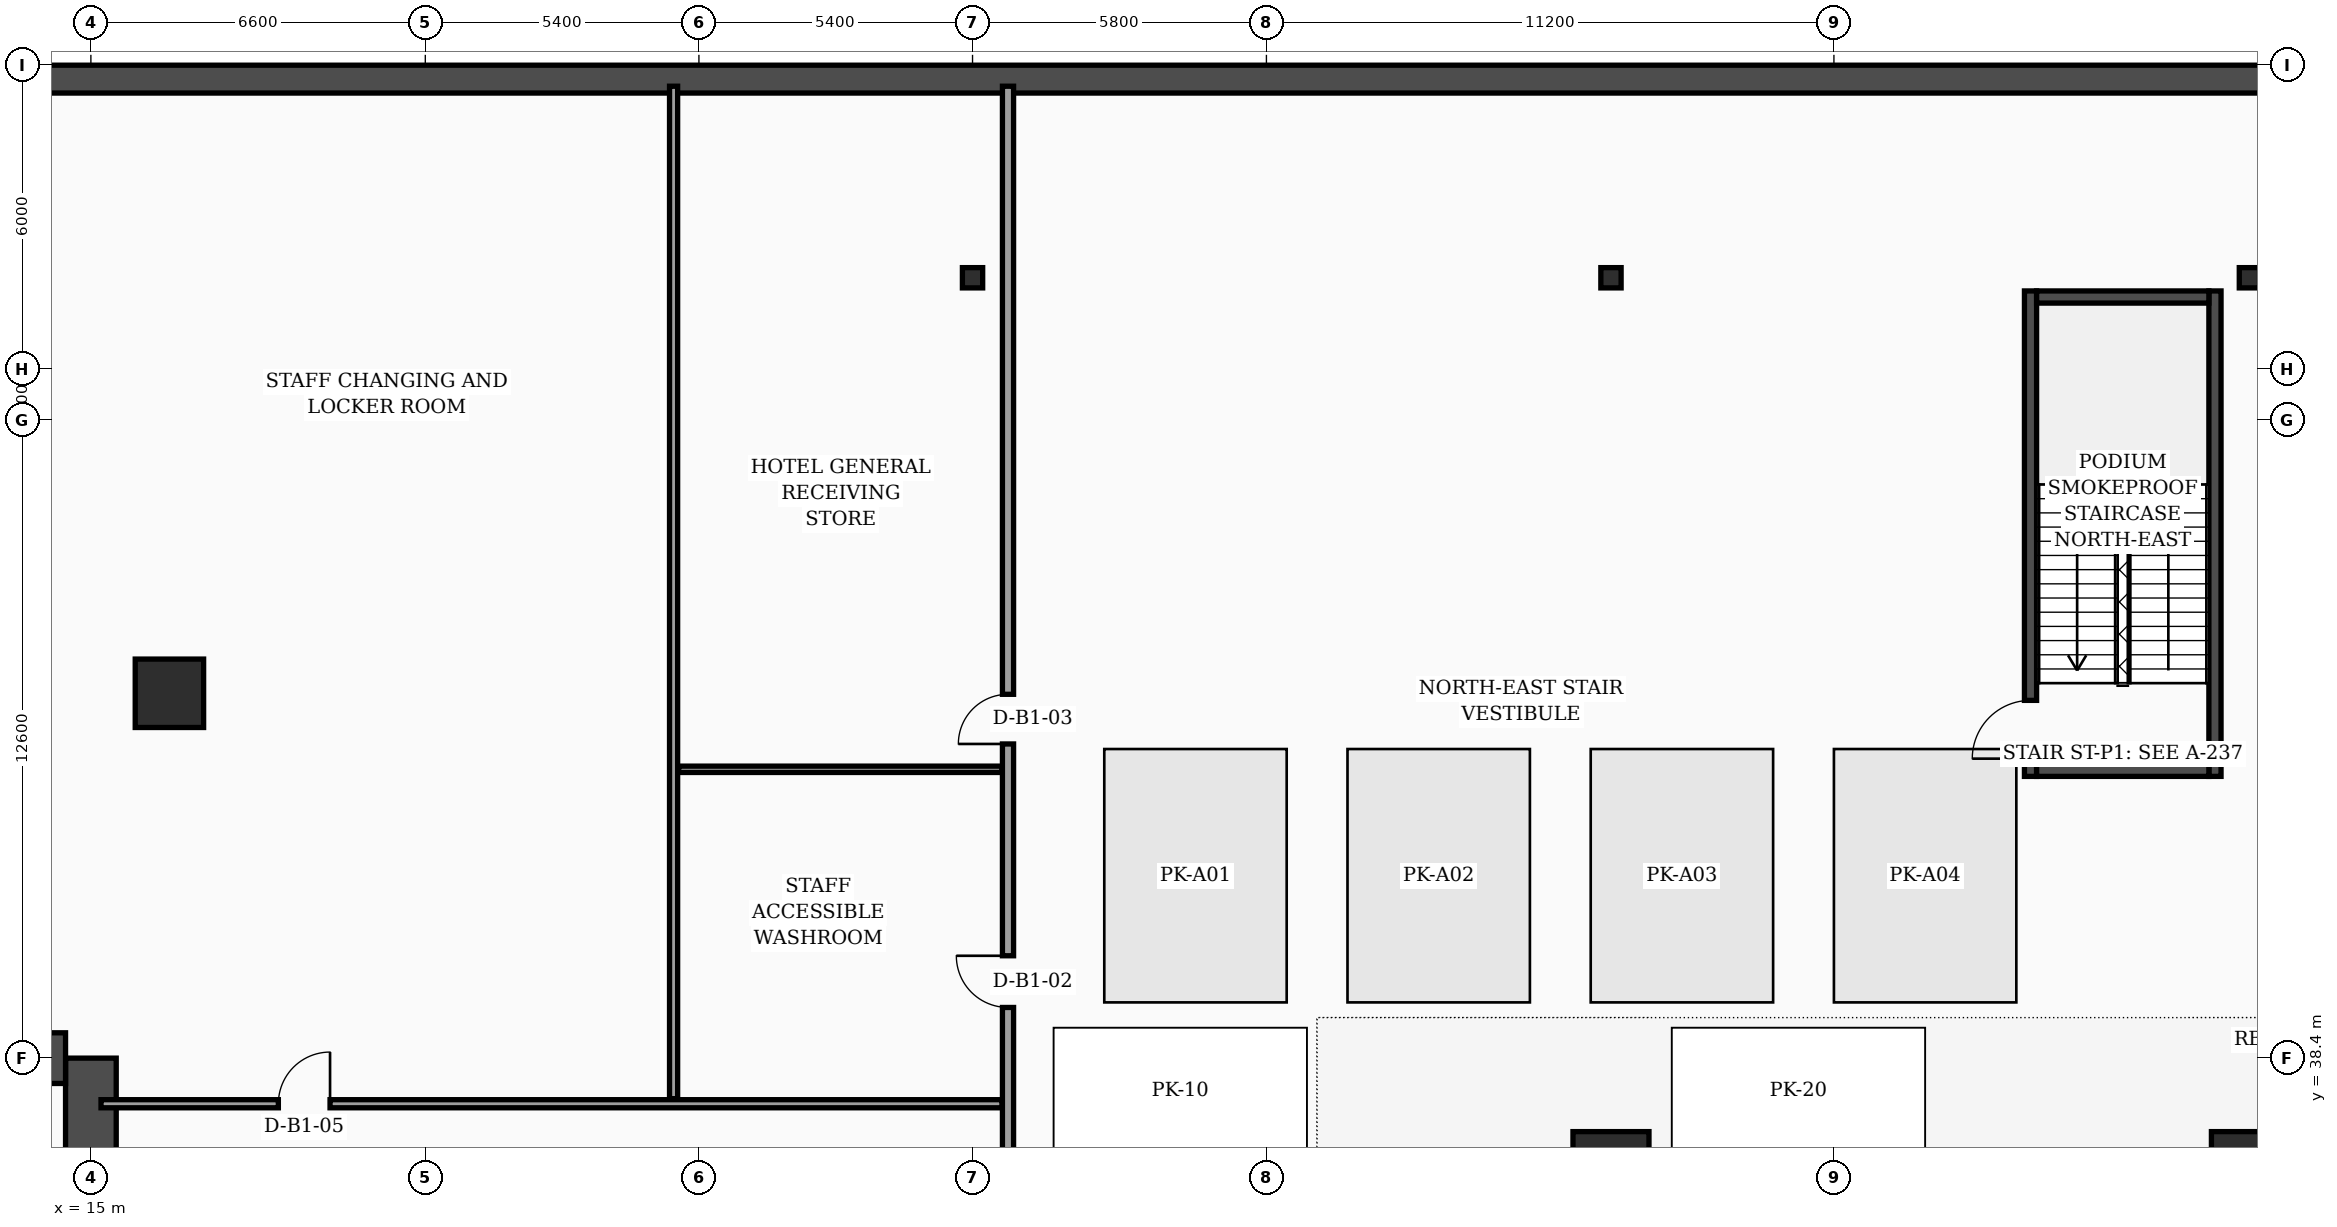
"""IFC4 building model, lengths in metres.
Left out: names, types, materials, properties, quantities, classifications, styles, units other than length and angle.
Written with IfcOpenShell. Run it as: python <this file> out.ifc"""

import sys

from ifc_helpers import new_model, si_unit, direction, frame, frame_2d, origin, origin_2d, place, context, subcontext, project, spatial, rectangle, i_section, extrude, element, fill, save


model = new_model("IFC4")
c1 = context("Model", 3, precision=1e-05, world=origin(), true_north=direction((0.0, 1.0)))
c2 = subcontext(c1, "Body", "Model", "MODEL_VIEW")
j1 = project(units=[si_unit("LENGTHUNIT", "METRE"), si_unit("PLANEANGLEUNIT", "RADIAN")], contexts=[c1])
p1 = place(None, origin())
s1 = spatial("IfcSite", under=j1, at=p1, CompositionType="ELEMENT")
p2 = place(p1, origin())
s2 = spatial("IfcBuilding", under=s1, at=p2, CompositionType="ELEMENT")
p3 = place(p2, frame((0.0, 0.0, -5.2)))
s3 = spatial("IfcBuildingStorey", under=s2, at=p3, CompositionType="ELEMENT", Elevation=-5.2)
p4 = place(p3, frame((83.72, 57.72, 0.0), z_axis=(0.0, 0.0, 1.0), x_axis=(-1.0, 0.0, 0.0)))
e1 = element("IfcWall", 1, at=p4, inside=s3, PredefinedType="USERDEFINED", context=c2, shape_type="SweptSolid", body=[
    extrude(rectangle(XDim=83.44, YDim=0.55, at=frame_2d((41.72, 0.0))), origin(), (0.0, 0.0, 1.0), 4.88),
])
p5 = place(p3, frame((15.0, 16.8, 0.0), z_axis=(0.0, 0.0, 1.0), x_axis=(0.0, 1.0, 0.0)))
e2 = element("IfcWall", 2, at=p5, inside=s3, PredefinedType="SHEAR", context=c2, shape_type="SweptSolid", body=[
    extrude(rectangle(XDim=21.6, YDim=1.0, at=frame_2d((10.8, 0.0))), origin(), (0.0, 0.0, 1.0), 4.88),
])
p6 = place(p5, frame((8.65, 0.0, 0.0)))
e3 = element("IfcOpeningElement", 3, at=p6, cuts=e2, PredefinedType="OPENING", context=c2, shape_type="SweptSolid", body=[
    extrude(rectangle(XDim=1.1, YDim=2.2, at=frame_2d((0.55, 1.1))), frame((0.0, 0.51, 0.0), z_axis=(0.0, -1.0, 0.0), x_axis=(1.0, 0.0, 0.0)), (0.0, 0.0, 1.0), 1.02),
])
p7 = place(p3, frame((4.7, 38.4, 0.0), z_axis=(0.0, 0.0, 1.0), x_axis=(1.0, 0.0, 0.0)))
e4 = element("IfcWall", 4, at=p7, inside=s3, PredefinedType="SHEAR", context=c2, shape_type="SweptSolid", body=[
    extrude(rectangle(XDim=9.8, YDim=1.0, at=frame_2d((4.9, 0.0))), origin(), (0.0, 0.0, 1.0), 4.88),
])
p8 = place(p3, frame((53.28, 43.96, 0.0), z_axis=(0.0, 0.0, 1.0), x_axis=(0.0, 1.0, 0.0)))
e5 = element("IfcWall", 5, at=p8, inside=s3, PredefinedType="SOLIDWALL", context=c2, shape_type="SweptSolid", body=[
    extrude(rectangle(XDim=9.58, YDim=0.24, at=frame_2d((4.79, 0.0))), origin(), (0.0, 0.0, 1.0), 4.88),
])
p9 = place(p8, frame((0.35, 0.0, 0.0)))
e6 = element("IfcOpeningElement", 6, at=p9, cuts=e5, PredefinedType="OPENING", context=c2, shape_type="SweptSolid", body=[
    extrude(rectangle(XDim=1.15, YDim=2.2, at=frame_2d((0.575, 1.1))), frame((0.0, 0.13, 0.0), z_axis=(0.0, -1.0, 0.0), x_axis=(1.0, 0.0, 0.0)), (0.0, 0.0, 1.0), 0.26),
])
p10 = place(p3, frame((56.92, 43.96, 0.0), z_axis=(0.0, 0.0, 1.0), x_axis=(0.0, 1.0, 0.0)))
e7 = element("IfcWall", 7, at=p10, inside=s3, PredefinedType="SOLIDWALL", context=c2, shape_type="SweptSolid", body=[
    extrude(rectangle(XDim=9.58, YDim=0.24, at=frame_2d((4.79, 0.0))), origin(), (0.0, 0.0, 1.0), 4.88),
])
for number, where, z_axis, x_axis in (
    (8, (53.4, 44.08, 0.0), (0.0, 0.0, 1.0), (1.0, 0.0, 0.0)),
    (9, (53.4, 53.42, 0.0), (0.0, 0.0, 1.0), (1.0, 0.0, 0.0)),
):
    element("IfcWall", number, at=place(p3, frame(where, z_axis=z_axis, x_axis=x_axis)), inside=s3, PredefinedType="SOLIDWALL", context=c2, shape_type="SweptSolid", body=[
        extrude(rectangle(XDim=3.4, YDim=0.24, at=frame_2d((1.7, 0.0))), origin(), (0.0, 0.0, 1.0), 4.88),
    ])
p11 = place(p3, frame((16.55, 45.6, 0.0), z_axis=(0.0, 0.0, 1.0), x_axis=(1.0, 0.0, 0.0)))
e10 = element("IfcColumn", 10, at=p11, inside=s3, PredefinedType="COLUMN", context=c2, shape_type="SweptSolid", body=[
    extrude(rectangle(XDim=1.35, YDim=1.35, at=origin_2d()), origin(), (0.0, 0.0, 1.0), 4.88),
])
for number, where, z_axis, x_axis in (
    (11, (45.0, 36.2, 0.0), (0.0, 0.0, 1.0), (1.0, 0.0, 0.0)),
    (12, (57.6, 36.2, 0.0), (0.0, 0.0, 1.0), (1.0, 0.0, 0.0)),
):
    element("IfcColumn", number, at=place(p3, frame(where, z_axis=z_axis, x_axis=x_axis)), inside=s3, PredefinedType="COLUMN", context=c2, shape_type="SweptSolid", body=[
        extrude(rectangle(XDim=1.5, YDim=1.5, at=origin_2d()), origin(), (0.0, 0.0, 1.0), 4.88),
    ])
for number, where, z_axis, x_axis in (
    (13, (32.4, 53.8, 0.0), (0.0, 0.0, 1.0), (1.0, 0.0, 0.0)),
    (14, (45.0, 53.8, 0.0), (0.0, 0.0, 1.0), (1.0, 0.0, 0.0)),
    (15, (57.6, 53.8, 0.0), (0.0, 0.0, 1.0), (1.0, 0.0, 0.0)),
):
    element("IfcColumn", number, at=place(p3, frame(where, z_axis=z_axis, x_axis=x_axis)), inside=s3, PredefinedType="PILASTER", context=c2, shape_type="SweptSolid", body=[
        extrude(i_section(OverallWidth=0.4, OverallDepth=0.4, WebThickness=0.013, FlangeThickness=0.021, FilletRadius=0.022, at=origin_2d()), origin(), (0.0, 0.0, 1.0), 4.88),
    ])
p12 = place(p3, frame((33.1, 15.2, 0.0), z_axis=(0.0, 0.0, 1.0), x_axis=(0.0, 1.0, 0.0)))
e16 = element("IfcWall", 16, at=p12, inside=s3, PredefinedType="SOLIDWALL", context=c2, shape_type="SweptSolid", body=[
    extrude(rectangle(XDim=42.38, YDim=0.22, at=frame_2d((21.19, 0.0))), origin(), (0.0, 0.0, 1.0), 4.08),
])
p13 = place(p12, frame((0.65, 0.0, 0.0)))
e17 = element("IfcOpeningElement", 17, at=p13, cuts=e16, PredefinedType="OPENING", context=c2, shape_type="SweptSolid", body=[
    extrude(rectangle(XDim=1.15, YDim=2.2, at=frame_2d((0.575, 1.1))), frame((0.0, 0.12, 0.0), z_axis=(0.0, -1.0, 0.0), x_axis=(1.0, 0.0, 0.0)), (0.0, 0.0, 1.0), 0.24),
])
p14 = place(p12, frame((24.2, 0.0, 0.0)))
e18 = element("IfcOpeningElement", 18, at=p14, cuts=e16, PredefinedType="OPENING", context=c2, shape_type="SweptSolid", body=[
    extrude(rectangle(XDim=1.02, YDim=2.2, at=frame_2d((0.51, 1.1))), frame((0.0, 0.12, 0.0), z_axis=(0.0, -1.0, 0.0), x_axis=(1.0, 0.0, 0.0)), (0.0, 0.0, 1.0), 0.24),
])
p15 = place(p12, frame((29.4, 0.0, 0.0)))
e19 = element("IfcOpeningElement", 19, at=p15, cuts=e16, PredefinedType="OPENING", context=c2, shape_type="SweptSolid", body=[
    extrude(rectangle(XDim=0.98, YDim=2.15, at=frame_2d((0.49, 1.075))), frame((0.0, 0.12, 0.0), z_axis=(0.0, -1.0, 0.0), x_axis=(1.0, 0.0, 0.0)), (0.0, 0.0, 1.0), 0.24),
])
p16 = place(p3, frame((15.2, 37.5, 0.0), z_axis=(0.0, 0.0, 1.0), x_axis=(1.0, 0.0, 0.0)))
e20 = element("IfcWall", 20, at=p16, inside=s3, PredefinedType="PARTITIONING", context=c2, shape_type="SweptSolid", body=[
    extrude(rectangle(XDim=17.78, YDim=0.16, at=frame_2d((8.89, 0.0))), origin(), (0.0, 0.0, 1.0), 4.38),
])
p17 = place(p16, frame((3.5, 0.0, 0.0)))
e21 = element("IfcOpeningElement", 21, at=p17, cuts=e20, PredefinedType="OPENING", context=c2, shape_type="SweptSolid", body=[
    extrude(rectangle(XDim=1.02, YDim=2.2, at=frame_2d((0.51, 1.1))), frame((0.0, 0.09, 0.0), z_axis=(0.0, -1.0, 0.0), x_axis=(1.0, 0.0, 0.0)), (0.0, 0.0, 1.0), 0.18),
])
p18 = place(p3, frame((26.5, 37.6, 0.0), z_axis=(0.0, 0.0, 1.0), x_axis=(0.0, 1.0, 0.0)))
e22 = element("IfcWall", 22, at=p18, inside=s3, PredefinedType="PARTITIONING", context=c2, shape_type="SweptSolid", body=[
    extrude(rectangle(XDim=19.98, YDim=0.16, at=frame_2d((9.99, 0.0))), origin(), (0.0, 0.0, 1.0), 4.08),
])
p19 = place(p3, frame((26.6, 44.1, 0.0), z_axis=(0.0, 0.0, 1.0), x_axis=(1.0, 0.0, 0.0)))
e23 = element("IfcWall", 23, at=p19, inside=s3, PredefinedType="PARTITIONING", context=c2, shape_type="SweptSolid", body=[
    extrude(rectangle(XDim=6.38, YDim=0.125, at=frame_2d((3.19, 0.0))), origin(), (0.0, 0.0, 1.0), 4.88),
])
p20 = place(p14, origin())
e24 = element("IfcDoor", 24, at=p20, inside=s3, OperationType="SINGLE_SWING_RIGHT", PredefinedType="DOOR", context=c2, shape_type="SweptSolid", body=[
    extrude(rectangle(XDim=1.02, YDim=2.2, at=frame_2d((0.51, 1.1))), frame((0.0, 0.025, 0.0), z_axis=(0.0, -1.0, 0.0), x_axis=(1.0, 0.0, 0.0)), (0.0, 0.0, 1.0), 0.05),
])
fill(e18, e24)
p21 = place(p15, origin())
e25 = element("IfcDoor", 25, at=p21, inside=s3, OperationType="SINGLE_SWING_LEFT", PredefinedType="DOOR", context=c2, shape_type="SweptSolid", body=[
    extrude(rectangle(XDim=0.98, YDim=2.15, at=frame_2d((0.49, 1.075))), frame((0.0, 0.025, 0.0), z_axis=(0.0, -1.0, 0.0), x_axis=(1.0, 0.0, 0.0)), (0.0, 0.0, 1.0), 0.05),
])
fill(e19, e25)
p22 = place(p17, origin())
e26 = element("IfcDoor", 26, at=p22, inside=s3, OperationType="SINGLE_SWING_RIGHT", PredefinedType="DOOR", context=c2, shape_type="SweptSolid", body=[
    extrude(rectangle(XDim=1.02, YDim=2.2, at=frame_2d((0.51, 1.1))), frame((0.0, 0.025, 0.0), z_axis=(0.0, -1.0, 0.0), x_axis=(1.0, 0.0, 0.0)), (0.0, 0.0, 1.0), 0.05),
])
fill(e21, e26)
p23 = place(p9, origin())
e27 = element("IfcDoor", 27, at=p23, inside=s3, OperationType="SINGLE_SWING_LEFT", PredefinedType="DOOR", context=c2, shape_type="SweptSolid", body=[
    extrude(rectangle(XDim=1.15, YDim=2.2, at=frame_2d((0.575, 1.1))), frame((0.0, 0.025, 0.0), z_axis=(0.0, -1.0, 0.0), x_axis=(1.0, 0.0, 0.0)), (0.0, 0.0, 1.0), 0.05),
])
fill(e6, e27)
save(model, sys.argv[1])
